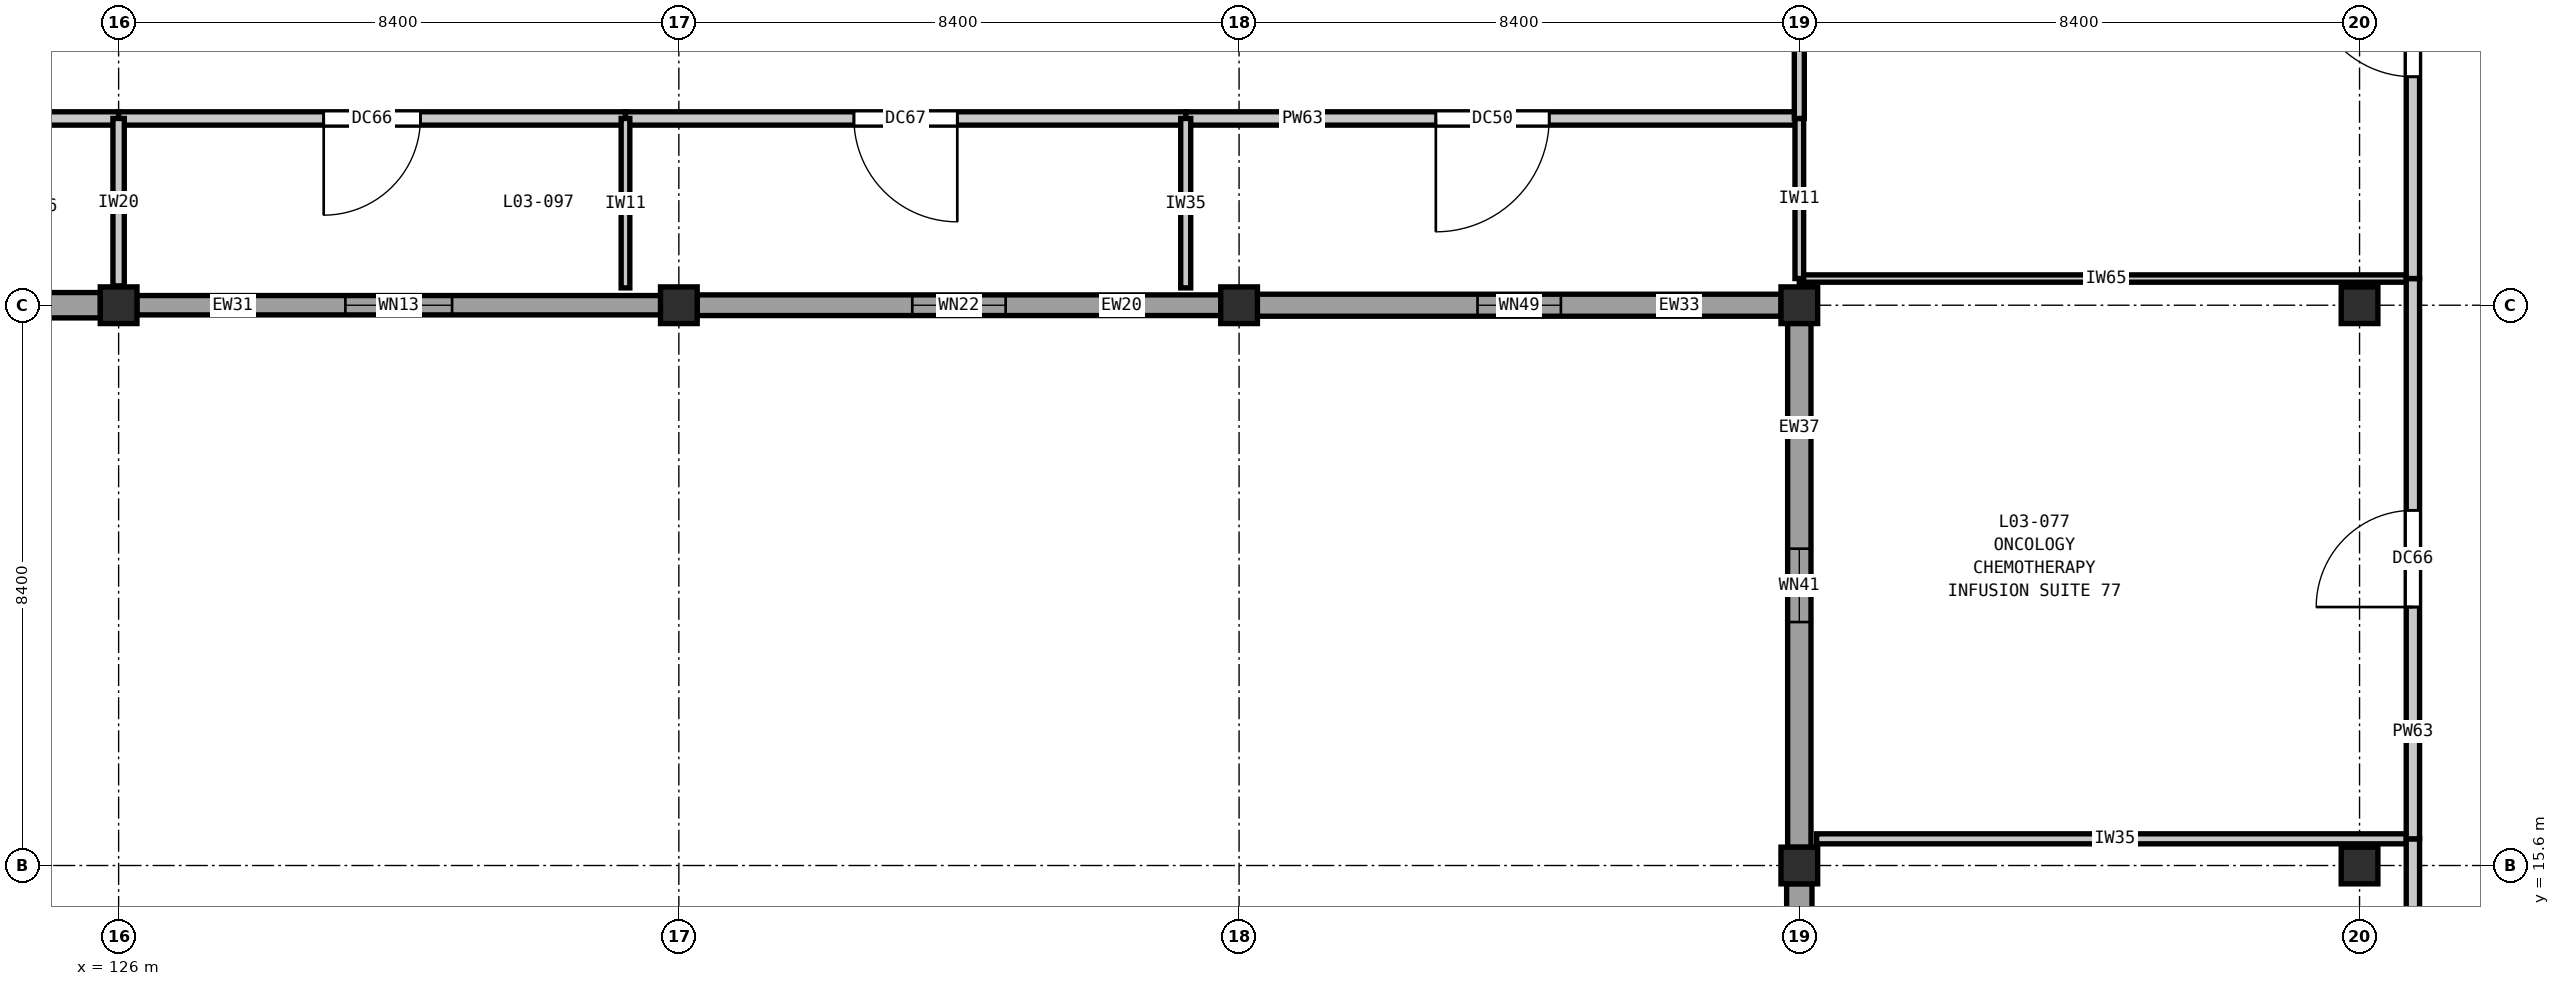
"""IFC4 building model, lengths in metres.
Left out: names, types, materials, properties, quantities, classifications, styles, units other than length and angle.
Written with IfcOpenShell. Run it as: python <this file> out.ifc"""

import sys

from ifc_helpers import new_model, si_unit, direction, frame, frame_2d, origin, origin_2d, place, context, subcontext, project, spatial, rectangle, extrude, element, fill, save


model = new_model("IFC4")
c1 = context("Model", 3, precision=1e-05, world=origin(), true_north=direction((0.0, 1.0)))
c2 = subcontext(c1, "Body", "Model", "MODEL_VIEW")
j1 = project(units=[si_unit("LENGTHUNIT", "METRE"), si_unit("PLANEANGLEUNIT", "RADIAN")], contexts=[c1])
p1 = place(None, origin())
s1 = spatial("IfcSite", under=j1, at=p1, CompositionType="ELEMENT")
p2 = place(p1, origin())
s2 = spatial("IfcBuilding", under=s1, at=p2, CompositionType="ELEMENT")
p3 = place(p2, frame((0.0, 0.0, 16.2)))
s3 = spatial("IfcBuildingStorey", under=s2, at=p3, CompositionType="ELEMENT", Elevation=16.2)
for number, where, z_axis, x_axis in (
    (1, (126.0, 24.0, 0.0), (0.0, 0.0, 1.0), (1.0, 0.0, 0.0)),
    (2, (134.4, 24.0, 0.0), (0.0, 0.0, 1.0), (1.0, 0.0, 0.0)),
    (3, (142.8, 24.0, 0.0), (0.0, 0.0, 1.0), (1.0, 0.0, 0.0)),
    (4, (151.2, 15.6, 0.0), (0.0, 0.0, 1.0), (1.0, 0.0, 0.0)),
    (5, (151.2, 24.0, 0.0), (0.0, 0.0, 1.0), (1.0, 0.0, 0.0)),
    (6, (159.6, 15.6, 0.0), (0.0, 0.0, 1.0), (1.0, 0.0, 0.0)),
    (7, (159.6, 24.0, 0.0), (0.0, 0.0, 1.0), (1.0, 0.0, 0.0)),
):
    element("IfcColumn", number, at=place(p3, frame(where, z_axis=z_axis, x_axis=x_axis)), inside=s3, PredefinedType="COLUMN", context=c2, shape_type="SweptSolid", body=[
        extrude(rectangle(XDim=0.55, YDim=0.55, at=origin_2d()), origin(), (0.0, 0.0, 1.0), 4.2),
    ])
p4 = place(p3, frame((151.2, 7.473, 0.0), z_axis=(0.0, 0.0, 1.0), x_axis=(0.0, 1.0, 0.0)))
e8 = element("IfcWall", 8, at=p4, inside=s3, PredefinedType="SOLIDWALL", context=c2, shape_type="SweptSolid", body=[
    extrude(rectangle(XDim=7.854, YDim=0.38, at=frame_2d((3.927, 0.0))), origin(), (0.0, 0.0, 1.0), 3.48),
])
p5 = place(p4, frame((2.752, 0.0, 0.9)))
e9 = element("IfcOpeningElement", 9, at=p5, cuts=e8, PredefinedType="OPENING", context=c2, shape_type="SweptSolid", body=[
    extrude(rectangle(XDim=2.35, YDim=1.75, at=frame_2d((1.175, 0.875))), frame((0.0, 0.2, 0.0), z_axis=(0.0, -1.0, 0.0), x_axis=(1.0, 0.0, 0.0)), (0.0, 0.0, 1.0), 0.4),
])
p6 = place(p3, frame((151.2, 15.873, 0.0), z_axis=(0.0, 0.0, 1.0), x_axis=(0.0, 1.0, 0.0)))
e10 = element("IfcWall", 10, at=p6, inside=s3, PredefinedType="SOLIDWALL", context=c2, shape_type="SweptSolid", body=[
    extrude(rectangle(XDim=7.854, YDim=0.35, at=frame_2d((3.927, 0.0))), origin(), (0.0, 0.0, 1.0), 3.48),
])
p7 = place(p6, frame((3.377, 0.0, 0.9)))
e11 = element("IfcOpeningElement", 11, at=p7, cuts=e10, PredefinedType="OPENING", context=c2, shape_type="SweptSolid", body=[
    extrude(rectangle(XDim=1.1, YDim=1.95, at=frame_2d((0.55, 0.975))), frame((0.0, 0.185, 0.0), z_axis=(0.0, -1.0, 0.0), x_axis=(1.0, 0.0, 0.0)), (0.0, 0.0, 1.0), 0.37),
])
p8 = place(p3, frame((150.927, 24.0, 0.0), z_axis=(0.0, 0.0, 1.0), x_axis=(-1.0, 0.0, 0.0)))
e12 = element("IfcWall", 12, at=p8, inside=s3, PredefinedType="SOLIDWALL", context=c2, shape_type="SweptSolid", body=[
    extrude(rectangle(XDim=7.854, YDim=0.33, at=frame_2d((3.927, 0.0))), origin(), (0.0, 0.0, 1.0), 3.48),
])
p9 = place(p8, frame((3.302, 0.0, 0.9)))
e13 = element("IfcOpeningElement", 13, at=p9, cuts=e12, PredefinedType="OPENING", context=c2, shape_type="SweptSolid", body=[
    extrude(rectangle(XDim=1.25, YDim=1.95, at=frame_2d((0.625, 0.975))), frame((0.0, 0.175, 0.0), z_axis=(0.0, -1.0, 0.0), x_axis=(1.0, 0.0, 0.0)), (0.0, 0.0, 1.0), 0.35),
])
p10 = place(p3, frame((142.527, 24.0, 0.0), z_axis=(0.0, 0.0, 1.0), x_axis=(-1.0, 0.0, 0.0)))
e14 = element("IfcWall", 14, at=p10, inside=s3, PredefinedType="SOLIDWALL", context=c2, shape_type="SweptSolid", body=[
    extrude(rectangle(XDim=7.854, YDim=0.31, at=frame_2d((3.927, 0.0))), origin(), (0.0, 0.0, 1.0), 3.48),
])
p11 = place(p10, frame((3.227, 0.0, 0.9)))
e15 = element("IfcOpeningElement", 15, at=p11, cuts=e14, PredefinedType="OPENING", context=c2, shape_type="SweptSolid", body=[
    extrude(rectangle(XDim=1.4, YDim=1.95, at=frame_2d((0.7, 0.975))), frame((0.0, 0.165, 0.0), z_axis=(0.0, -1.0, 0.0), x_axis=(1.0, 0.0, 0.0)), (0.0, 0.0, 1.0), 0.33),
])
p12 = place(p3, frame((134.127, 24.0, 0.0), z_axis=(0.0, 0.0, 1.0), x_axis=(-1.0, 0.0, 0.0)))
e16 = element("IfcWall", 16, at=p12, inside=s3, PredefinedType="SOLIDWALL", context=c2, shape_type="SweptSolid", body=[
    extrude(rectangle(XDim=7.854, YDim=0.29, at=frame_2d((3.927, 0.0))), origin(), (0.0, 0.0, 1.0), 3.48),
])
p13 = place(p12, frame((3.127, 0.0, 0.9)))
e17 = element("IfcOpeningElement", 17, at=p13, cuts=e16, PredefinedType="OPENING", context=c2, shape_type="SweptSolid", body=[
    extrude(rectangle(XDim=1.6, YDim=1.95, at=frame_2d((0.8, 0.975))), frame((0.0, 0.155, 0.0), z_axis=(0.0, -1.0, 0.0), x_axis=(1.0, 0.0, 0.0)), (0.0, 0.0, 1.0), 0.31),
])
p14 = place(p3, frame((125.727, 24.0, 0.0), z_axis=(0.0, 0.0, 1.0), x_axis=(-1.0, 0.0, 0.0)))
e18 = element("IfcWall", 18, at=p14, inside=s3, PredefinedType="SOLIDWALL", context=c2, shape_type="SweptSolid", body=[
    extrude(rectangle(XDim=7.854, YDim=0.38, at=frame_2d((3.927, 0.0))), origin(), (0.0, 0.0, 1.0), 3.48),
])
p15 = place(p14, frame((3.027, 0.0, 0.9)))
e19 = element("IfcOpeningElement", 19, at=p15, cuts=e18, PredefinedType="OPENING", context=c2, shape_type="SweptSolid", body=[
    extrude(rectangle(XDim=1.8, YDim=1.95, at=frame_2d((0.9, 0.975))), frame((0.0, 0.2, 0.0), z_axis=(0.0, -1.0, 0.0), x_axis=(1.0, 0.0, 0.0)), (0.0, 0.0, 1.0), 0.4),
])
p16 = place(p3, frame((151.46, 16.0, 0.0), z_axis=(0.0, 0.0, 1.0), x_axis=(1.0, 0.0, 0.0)))
e20 = element("IfcWall", 20, at=p16, inside=s3, PredefinedType="PARTITIONING", context=c2, shape_type="SweptSolid", body=[
    extrude(rectangle(XDim=8.94, YDim=0.15, at=frame_2d((4.47, 0.0))), origin(), (0.0, 0.0, 1.0), 3.89),
])
p17 = place(p3, frame((151.2, 24.4, 0.0), z_axis=(0.0, 0.0, 1.0), x_axis=(1.0, 0.0, 0.0)))
e21 = element("IfcWall", 21, at=p17, inside=s3, PredefinedType="PARTITIONING", context=c2, shape_type="SweptSolid", body=[
    extrude(rectangle(XDim=9.2, YDim=0.11, at=frame_2d((4.6, 0.0))), origin(), (0.0, 0.0, 1.0), 3.89),
])
p18 = place(p3, frame((117.86, 26.8, 0.0), z_axis=(0.0, 0.0, 1.0), x_axis=(1.0, 0.0, 0.0)))
e22 = element("IfcWall", 22, at=p18, inside=s3, PredefinedType="PARTITIONING", context=c2, shape_type="SweptSolid", body=[
    extrude(rectangle(XDim=8.14, YDim=0.2, at=frame_2d((4.07, 0.0))), origin(), (0.0, 0.0, 1.0), 3.89),
])
p19 = place(p18, frame((3.395, 0.0, 0.0)))
e23 = element("IfcOpeningElement", 23, at=p19, cuts=e22, PredefinedType="OPENING", context=c2, shape_type="SweptSolid", body=[
    extrude(rectangle(XDim=1.35, YDim=2.2, at=frame_2d((0.675, 1.1))), frame((0.0, 0.11, 0.0), z_axis=(0.0, -1.0, 0.0), x_axis=(1.0, 0.0, 0.0)), (0.0, 0.0, 1.0), 0.22),
])
p20 = place(p3, frame((126.0, 26.8, 0.0), z_axis=(0.0, 0.0, 1.0), x_axis=(1.0, 0.0, 0.0)))
e24 = element("IfcWall", 24, at=p20, inside=s3, PredefinedType="PARTITIONING", context=c2, shape_type="SweptSolid", body=[
    extrude(rectangle(XDim=7.6, YDim=0.2, at=frame_2d((3.8, 0.0))), origin(), (0.0, 0.0, 1.0), 3.89),
])
p21 = place(p20, frame((3.075, 0.0, 0.0)))
e25 = element("IfcOpeningElement", 25, at=p21, cuts=e24, PredefinedType="OPENING", context=c2, shape_type="SweptSolid", body=[
    extrude(rectangle(XDim=1.45, YDim=2.25, at=frame_2d((0.725, 1.125))), frame((0.0, 0.11, 0.0), z_axis=(0.0, -1.0, 0.0), x_axis=(1.0, 0.0, 0.0)), (0.0, 0.0, 1.0), 0.22),
])
p22 = place(p3, frame((133.6, 26.8, 0.0), z_axis=(0.0, 0.0, 1.0), x_axis=(1.0, 0.0, 0.0)))
e26 = element("IfcWall", 26, at=p22, inside=s3, PredefinedType="PARTITIONING", context=c2, shape_type="SweptSolid", body=[
    extrude(rectangle(XDim=8.4, YDim=0.2, at=frame_2d((4.2, 0.0))), origin(), (0.0, 0.0, 1.0), 3.89),
])
p23 = place(p22, frame((3.425, 0.0, 0.0)))
e27 = element("IfcOpeningElement", 27, at=p23, cuts=e26, PredefinedType="OPENING", context=c2, shape_type="SweptSolid", body=[
    extrude(rectangle(XDim=1.55, YDim=2.25, at=frame_2d((0.775, 1.125))), frame((0.0, 0.11, 0.0), z_axis=(0.0, -1.0, 0.0), x_axis=(1.0, 0.0, 0.0)), (0.0, 0.0, 1.0), 0.22),
])
p24 = place(p3, frame((142.0, 26.8, 0.0), z_axis=(0.0, 0.0, 1.0), x_axis=(1.0, 0.0, 0.0)))
e28 = element("IfcWall", 28, at=p24, inside=s3, PredefinedType="PARTITIONING", context=c2, shape_type="SweptSolid", body=[
    extrude(rectangle(XDim=9.2, YDim=0.2, at=frame_2d((4.6, 0.0))), origin(), (0.0, 0.0, 1.0), 3.89),
])
p25 = place(p24, frame((3.75, 0.0, 0.0)))
e29 = element("IfcOpeningElement", 29, at=p25, cuts=e28, PredefinedType="OPENING", context=c2, shape_type="SweptSolid", body=[
    extrude(rectangle(XDim=1.7, YDim=2.3, at=frame_2d((0.85, 1.15))), frame((0.0, 0.11, 0.0), z_axis=(0.0, -1.0, 0.0), x_axis=(1.0, 0.0, 0.0)), (0.0, 0.0, 1.0), 0.22),
])
p26 = place(p3, frame((126.0, 24.29, 0.0), z_axis=(0.0, 0.0, 1.0), x_axis=(0.0, 1.0, 0.0)))
e30 = element("IfcWall", 30, at=p26, inside=s3, PredefinedType="PARTITIONING", context=c2, shape_type="SweptSolid", body=[
    extrude(rectangle(XDim=2.51, YDim=0.17, at=frame_2d((1.255, 0.0))), origin(), (0.0, 0.0, 1.0), 3.585),
])
p27 = place(p3, frame((133.6, 24.26, 0.0), z_axis=(0.0, 0.0, 1.0), x_axis=(0.0, 1.0, 0.0)))
e31 = element("IfcWall", 31, at=p27, inside=s3, PredefinedType="PARTITIONING", context=c2, shape_type="SweptSolid", body=[
    extrude(rectangle(XDim=2.54, YDim=0.13, at=frame_2d((1.27, 0.0))), origin(), (0.0, 0.0, 1.0), 3.89),
])
p28 = place(p3, frame((142.0, 24.26, 0.0), z_axis=(0.0, 0.0, 1.0), x_axis=(0.0, 1.0, 0.0)))
e32 = element("IfcWall", 32, at=p28, inside=s3, PredefinedType="PARTITIONING", context=c2, shape_type="SweptSolid", body=[
    extrude(rectangle(XDim=2.54, YDim=0.15, at=frame_2d((1.27, 0.0))), origin(), (0.0, 0.0, 1.0), 3.89),
])
p29 = place(p3, frame((151.2, 24.4, 0.0), z_axis=(0.0, 0.0, 1.0), x_axis=(0.0, 1.0, 0.0)))
e33 = element("IfcWall", 33, at=p29, inside=s3, PredefinedType="PARTITIONING", context=c2, shape_type="SweptSolid", body=[
    extrude(rectangle(XDim=2.4, YDim=0.13, at=frame_2d((1.2, 0.0))), origin(), (0.0, 0.0, 1.0), 3.585),
])
p30 = place(p3, frame((151.2, 26.8, 0.0), z_axis=(0.0, 0.0, 1.0), x_axis=(0.0, 1.0, 0.0)))
e34 = element("IfcWall", 34, at=p30, inside=s3, PredefinedType="PARTITIONING", context=c2, shape_type="SweptSolid", body=[
    extrude(rectangle(XDim=2.8, YDim=0.15, at=frame_2d((1.4, 0.0))), origin(), (0.0, 0.0, 1.0), 3.585),
])
p31 = place(p3, frame((160.4, 8.4, 0.0), z_axis=(0.0, 0.0, 1.0), x_axis=(0.0, 1.0, 0.0)))
e35 = element("IfcWall", 35, at=p31, inside=s3, PredefinedType="PARTITIONING", context=c2, shape_type="SweptSolid", body=[
    extrude(rectangle(XDim=7.6, YDim=0.2, at=frame_2d((3.8, 0.0))), origin(), (0.0, 0.0, 1.0), 3.89),
])
p32 = place(p31, frame((3.125, 0.0, 0.0)))
e36 = element("IfcOpeningElement", 36, at=p32, cuts=e35, PredefinedType="OPENING", context=c2, shape_type="SweptSolid", body=[
    extrude(rectangle(XDim=1.35, YDim=2.2, at=frame_2d((0.675, 1.1))), frame((0.0, 0.11, 0.0), z_axis=(0.0, -1.0, 0.0), x_axis=(1.0, 0.0, 0.0)), (0.0, 0.0, 1.0), 0.22),
])
p33 = place(p3, frame((160.4, 16.0, 0.0), z_axis=(0.0, 0.0, 1.0), x_axis=(0.0, 1.0, 0.0)))
e37 = element("IfcWall", 37, at=p33, inside=s3, PredefinedType="PARTITIONING", context=c2, shape_type="SweptSolid", body=[
    extrude(rectangle(XDim=8.4, YDim=0.2, at=frame_2d((4.2, 0.0))), origin(), (0.0, 0.0, 1.0), 3.89),
])
p34 = place(p33, frame((3.475, 0.0, 0.0)))
e38 = element("IfcOpeningElement", 38, at=p34, cuts=e37, PredefinedType="OPENING", context=c2, shape_type="SweptSolid", body=[
    extrude(rectangle(XDim=1.45, YDim=2.25, at=frame_2d((0.725, 1.125))), frame((0.0, 0.11, 0.0), z_axis=(0.0, -1.0, 0.0), x_axis=(1.0, 0.0, 0.0)), (0.0, 0.0, 1.0), 0.22),
])
p35 = place(p3, frame((160.4, 24.4, 0.0), z_axis=(0.0, 0.0, 1.0), x_axis=(0.0, 1.0, 0.0)))
e39 = element("IfcWall", 39, at=p35, inside=s3, PredefinedType="PARTITIONING", context=c2, shape_type="SweptSolid", body=[
    extrude(rectangle(XDim=7.6, YDim=0.2, at=frame_2d((3.8, 0.0))), origin(), (0.0, 0.0, 1.0), 3.89),
])
p36 = place(p35, frame((3.025, 0.0, 0.0)))
e40 = element("IfcOpeningElement", 40, at=p36, cuts=e39, PredefinedType="OPENING", context=c2, shape_type="SweptSolid", body=[
    extrude(rectangle(XDim=1.55, YDim=2.25, at=frame_2d((0.775, 1.125))), frame((0.0, 0.11, 0.0), z_axis=(0.0, -1.0, 0.0), x_axis=(1.0, 0.0, 0.0)), (0.0, 0.0, 1.0), 0.22),
])
p37 = place(p7, origin())
e41 = element("IfcWindow", 41, at=p37, inside=s3, PartitioningType="SINGLE_PANEL", PredefinedType="WINDOW", context=c2, shape_type="SweptSolid", body=[
    extrude(rectangle(XDim=1.1, YDim=1.95, at=frame_2d((0.55, 0.975))), frame((0.0, 0.03, 0.0), z_axis=(0.0, -1.0, 0.0), x_axis=(1.0, 0.0, 0.0)), (0.0, 0.0, 1.0), 0.06),
])
fill(e11, e41)
p38 = place(p9, origin())
e42 = element("IfcWindow", 42, at=p38, inside=s3, PartitioningType="SINGLE_PANEL", PredefinedType="WINDOW", context=c2, shape_type="SweptSolid", body=[
    extrude(rectangle(XDim=1.25, YDim=1.95, at=frame_2d((0.625, 0.975))), frame((0.0, 0.03, 0.0), z_axis=(0.0, -1.0, 0.0), x_axis=(1.0, 0.0, 0.0)), (0.0, 0.0, 1.0), 0.06),
])
fill(e13, e42)
p39 = place(p11, origin())
e43 = element("IfcWindow", 43, at=p39, inside=s3, PartitioningType="SINGLE_PANEL", PredefinedType="WINDOW", context=c2, shape_type="SweptSolid", body=[
    extrude(rectangle(XDim=1.4, YDim=1.95, at=frame_2d((0.7, 0.975))), frame((0.0, 0.03, 0.0), z_axis=(0.0, -1.0, 0.0), x_axis=(1.0, 0.0, 0.0)), (0.0, 0.0, 1.0), 0.06),
])
fill(e15, e43)
p40 = place(p13, origin())
e44 = element("IfcWindow", 44, at=p40, inside=s3, PartitioningType="DOUBLE_PANEL_VERTICAL", PredefinedType="WINDOW", context=c2, shape_type="SweptSolid", body=[
    extrude(rectangle(XDim=1.6, YDim=1.95, at=frame_2d((0.8, 0.975))), frame((0.0, 0.03, 0.0), z_axis=(0.0, -1.0, 0.0), x_axis=(1.0, 0.0, 0.0)), (0.0, 0.0, 1.0), 0.06),
])
fill(e17, e44)
p41 = place(p21, frame((1.45, 0.0, 0.0), z_axis=(0.0, 0.0, 1.0), x_axis=(-1.0, 0.0, 0.0)))
e45 = element("IfcDoor", 45, at=p41, inside=s3, OperationType="SINGLE_SWING_RIGHT", PredefinedType="DOOR", context=c2, shape_type="SweptSolid", body=[
    extrude(rectangle(XDim=1.45, YDim=2.25, at=frame_2d((0.725, 1.125))), frame((0.0, 0.025, 0.0), z_axis=(0.0, -1.0, 0.0), x_axis=(1.0, 0.0, 0.0)), (0.0, 0.0, 1.0), 0.05),
])
fill(e25, e45)
p42 = place(p23, frame((1.55, 0.0, 0.0), z_axis=(0.0, 0.0, 1.0), x_axis=(-1.0, 0.0, 0.0)))
e46 = element("IfcDoor", 46, at=p42, inside=s3, OperationType="SINGLE_SWING_LEFT", PredefinedType="DOOR", context=c2, shape_type="SweptSolid", body=[
    extrude(rectangle(XDim=1.55, YDim=2.25, at=frame_2d((0.775, 1.125))), frame((0.0, 0.025, 0.0), z_axis=(0.0, -1.0, 0.0), x_axis=(1.0, 0.0, 0.0)), (0.0, 0.0, 1.0), 0.05),
])
fill(e27, e46)
p43 = place(p25, frame((1.7, 0.0, 0.0), z_axis=(0.0, 0.0, 1.0), x_axis=(-1.0, 0.0, 0.0)))
e47 = element("IfcDoor", 47, at=p43, inside=s3, OperationType="SINGLE_SWING_RIGHT", PredefinedType="DOOR", context=c2, shape_type="SweptSolid", body=[
    extrude(rectangle(XDim=1.7, YDim=2.3, at=frame_2d((0.85, 1.15))), frame((0.0, 0.025, 0.0), z_axis=(0.0, -1.0, 0.0), x_axis=(1.0, 0.0, 0.0)), (0.0, 0.0, 1.0), 0.05),
])
fill(e29, e47)
p44 = place(p34, origin())
e48 = element("IfcDoor", 48, at=p44, inside=s3, OperationType="SINGLE_SWING_LEFT", PredefinedType="DOOR", context=c2, shape_type="SweptSolid", body=[
    extrude(rectangle(XDim=1.45, YDim=2.25, at=frame_2d((0.725, 1.125))), frame((0.0, 0.025, 0.0), z_axis=(0.0, -1.0, 0.0), x_axis=(1.0, 0.0, 0.0)), (0.0, 0.0, 1.0), 0.05),
])
fill(e38, e48)
p45 = place(p36, origin())
e49 = element("IfcDoor", 49, at=p45, inside=s3, OperationType="SINGLE_SWING_RIGHT", PredefinedType="DOOR", context=c2, shape_type="SweptSolid", body=[
    extrude(rectangle(XDim=1.55, YDim=2.25, at=frame_2d((0.775, 1.125))), frame((0.0, 0.025, 0.0), z_axis=(0.0, -1.0, 0.0), x_axis=(1.0, 0.0, 0.0)), (0.0, 0.0, 1.0), 0.05),
])
fill(e40, e49)
save(model, sys.argv[1])
